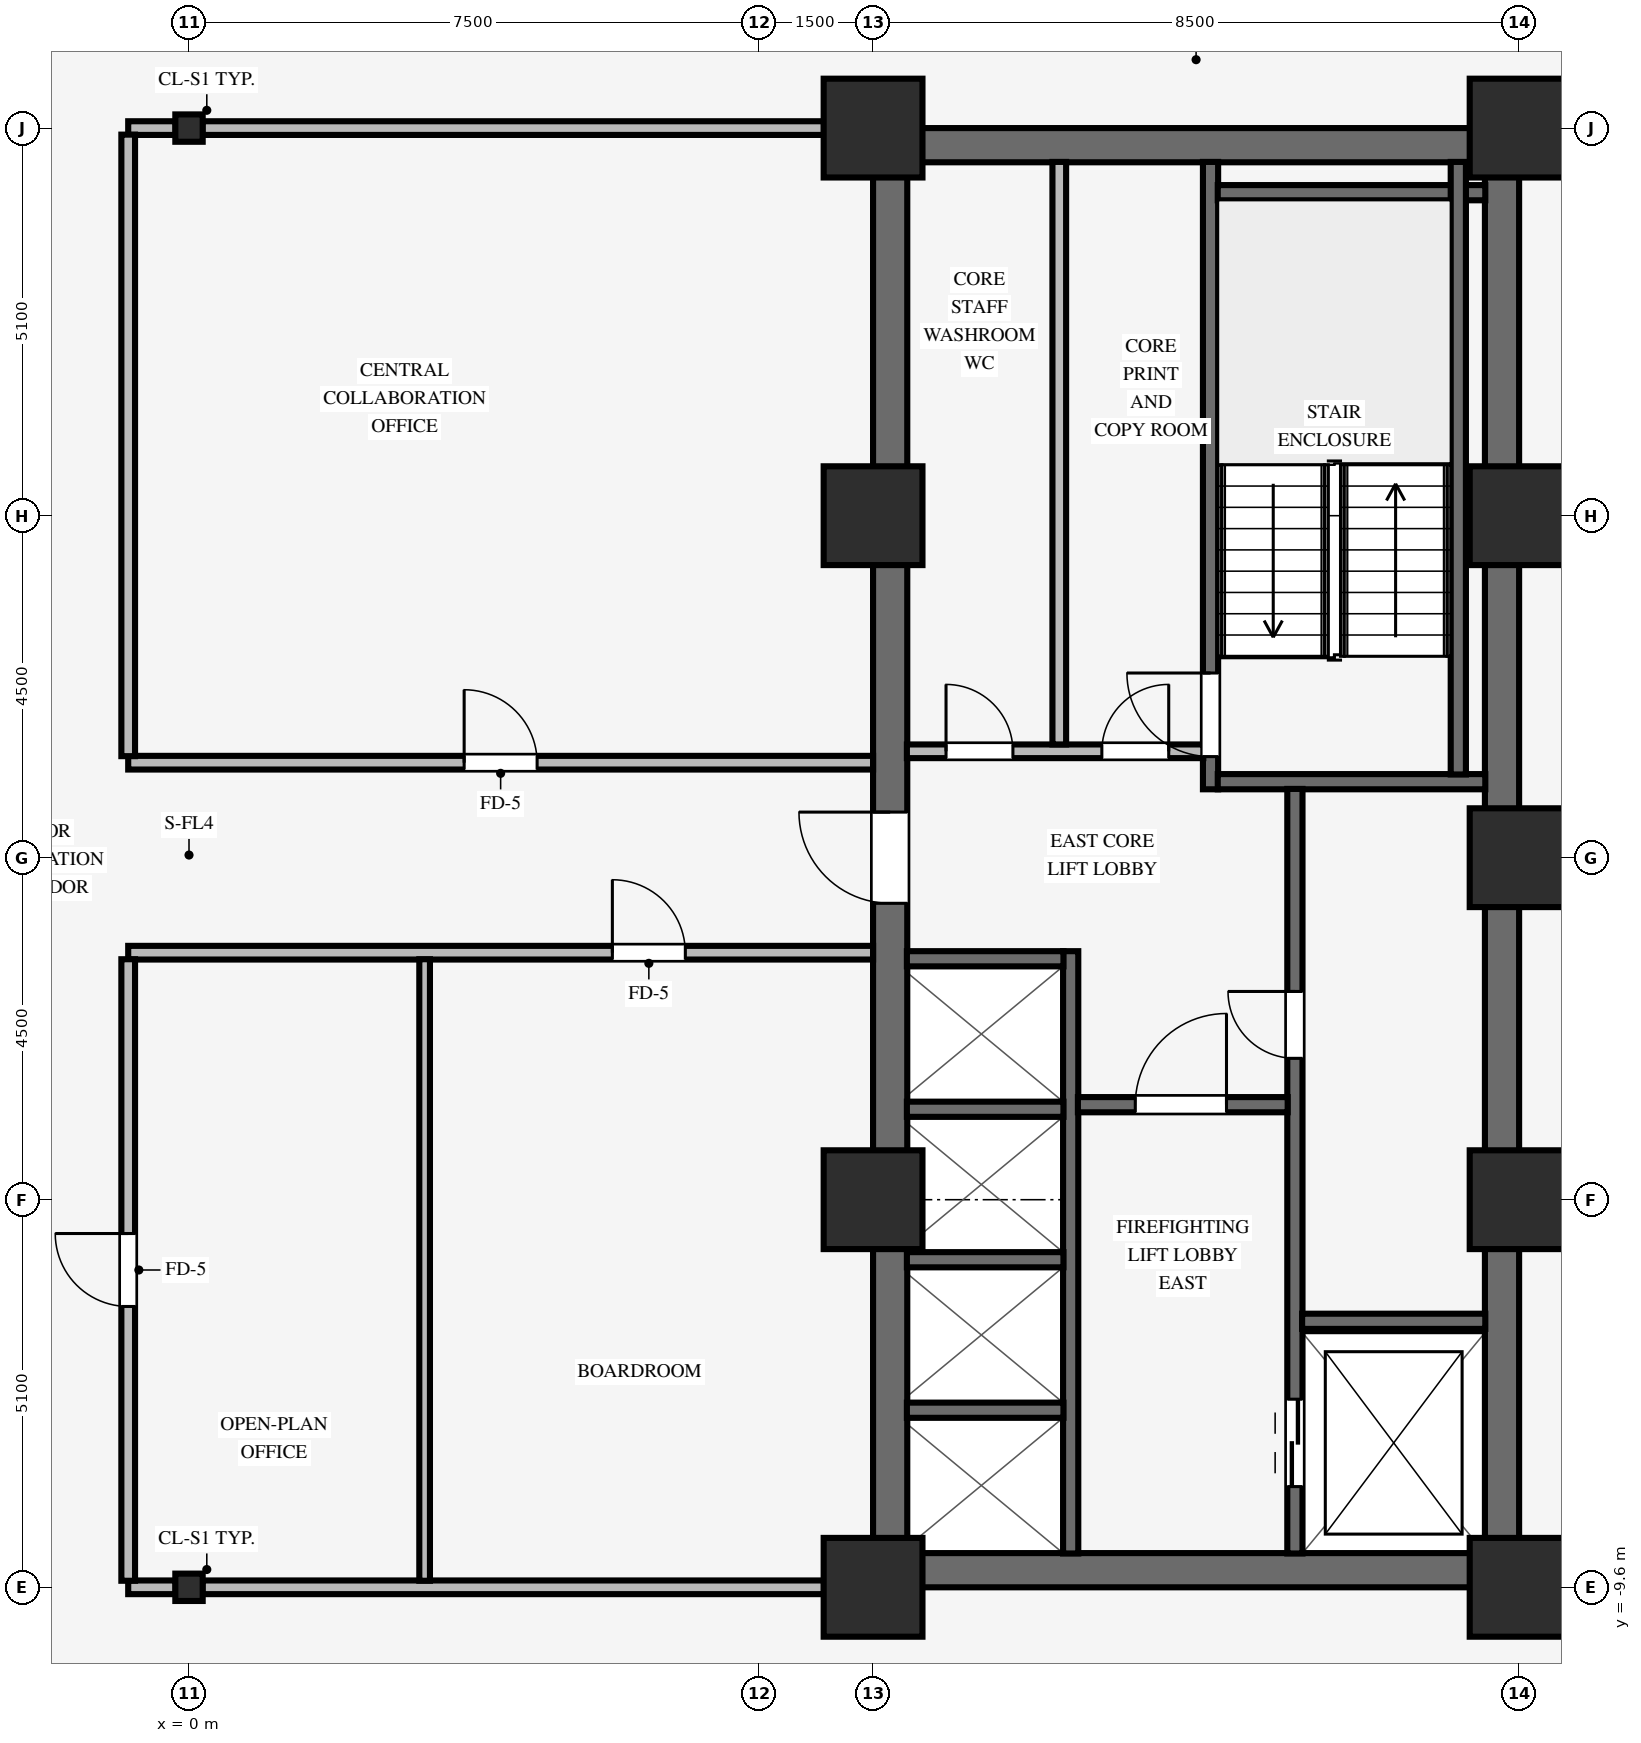
"""IFC4 building model, lengths in metres.
Left out: names, types, materials, properties, quantities, classifications, styles, units other than length and angle.
Written with IfcOpenShell. Run it as: python <this file> out.ifc"""

import sys

from ifc_helpers import new_model, si_unit, direction, frame, frame_2d, origin, origin_2d, place, context, subcontext, project, spatial, rectangle, i_section, extrude, source, transform, mapped, element, fill, save


model = new_model("IFC4")
c1 = context("Model", 3, precision=1e-05, world=origin(), true_north=direction((0.0, 1.0)))
c2 = subcontext(c1, "Body", "Model", "MODEL_VIEW")
j1 = project(units=[si_unit("LENGTHUNIT", "METRE"), si_unit("PLANEANGLEUNIT", "RADIAN")], contexts=[c1])
p1 = place(None, origin())
s1 = spatial("IfcSite", under=j1, at=p1, CompositionType="ELEMENT")
p2 = place(p1, origin())
s2 = spatial("IfcBuilding", under=s1, at=p2, CompositionType="ELEMENT")
p3 = place(p2, frame((0.0, 0.0, 31.25)))
s3 = spatial("IfcBuildingStorey", under=s2, at=p3, CompositionType="ELEMENT", Elevation=31.25)
for number, where, z_axis, x_axis in (
    (1, (9.0, -9.375, 0.0), (0.0, 0.0, 1.0), (1.0, 0.0, 0.0)),
    (2, (9.0, 9.375, 0.0), (0.0, 0.0, 1.0), (1.0, 0.0, 0.0)),
):
    element("IfcWall", number, at=place(p3, frame(where, z_axis=z_axis, x_axis=x_axis)), inside=s3, PredefinedType="SHEAR", context=c2, shape_type="SweptSolid", body=[
        extrude(rectangle(XDim=8.5, YDim=0.45, at=frame_2d((4.25, 0.0))), origin(), (0.0, 0.0, 1.0), 3.37),
    ])
p4 = place(p3, frame((9.225, -9.155, 0.0), z_axis=(0.0, 0.0, 1.0), x_axis=(0.0, 1.0, 0.0)))
e3 = element("IfcWall", 3, at=p4, inside=s3, PredefinedType="SHEAR", context=c2, shape_type="SweptSolid", body=[
    extrude(rectangle(XDim=18.31, YDim=0.45, at=frame_2d((9.155, 0.0))), origin(), (0.0, 0.0, 1.0), 3.37),
])
p5 = place(p4, frame((8.555, 0.0, 0.0)))
e4 = element("IfcOpeningElement", 4, at=p5, cuts=e3, PredefinedType="OPENING", context=c2, shape_type="SweptSolid", body=[
    extrude(rectangle(XDim=1.2, YDim=2.15, at=frame_2d((0.6, 1.075))), frame((0.0, 0.235, 0.0), z_axis=(0.0, -1.0, 0.0), x_axis=(1.0, 0.0, 0.0)), (0.0, 0.0, 1.0), 0.47),
])
p6 = place(p3, frame((17.275, -9.155, 0.0), z_axis=(0.0, 0.0, 1.0), x_axis=(0.0, 1.0, 0.0)))
e5 = element("IfcWall", 5, at=p6, inside=s3, PredefinedType="SHEAR", context=c2, shape_type="SweptSolid", body=[
    extrude(rectangle(XDim=18.31, YDim=0.45, at=frame_2d((9.155, 0.0))), origin(), (0.0, 0.0, 1.0), 3.37),
])
for number, where, z_axis, x_axis in (
    (6, (9.0, -9.6, 0.0), (0.0, 0.0, 1.0), (1.0, 0.0, 0.0)),
    (7, (9.0, -4.5, 0.0), (0.0, 0.0, 1.0), (1.0, 0.0, 0.0)),
    (8, (9.0, 4.5, 0.0), (0.0, 0.0, 1.0), (1.0, 0.0, 0.0)),
    (9, (9.0, 9.6, 0.0), (0.0, 0.0, 1.0), (1.0, 0.0, 0.0)),
    (10, (17.5, -9.6, 0.0), (0.0, 0.0, 1.0), (1.0, 0.0, 0.0)),
    (11, (17.5, -4.5, 0.0), (0.0, 0.0, 1.0), (1.0, 0.0, 0.0)),
    (12, (17.5, 4.5, 0.0), (0.0, 0.0, 1.0), (1.0, 0.0, 0.0)),
    (13, (17.5, 9.6, 0.0), (0.0, 0.0, 1.0), (1.0, 0.0, 0.0)),
    (14, (17.5, 0.0, 0.0), (0.0, 0.0, 1.0), (1.0, 0.0, 0.0)),
):
    element("IfcColumn", number, at=place(p3, frame(where, z_axis=z_axis, x_axis=x_axis)), inside=s3, PredefinedType="COLUMN", context=c2, shape_type="SweptSolid", body=[
        extrude(rectangle(XDim=1.3, YDim=1.3, at=origin_2d()), origin(), (0.0, 0.0, 1.0), 3.37),
    ])
for number, where, z_axis, x_axis in (
    (15, (0.0, -9.6, 0.0), (0.0, 0.0, 1.0), (1.0, 0.0, 0.0)),
    (16, (0.0, 9.6, 0.0), (0.0, 0.0, 1.0), (1.0, 0.0, 0.0)),
):
    element("IfcColumn", number, at=place(p3, frame(where, z_axis=z_axis, x_axis=x_axis)), inside=s3, PredefinedType="COLUMN", context=c2, shape_type="SweptSolid", body=[
        extrude(i_section(OverallWidth=0.36, OverallDepth=0.36, WebThickness=0.021, FlangeThickness=0.021, FilletRadius=0.018, at=origin_2d()), origin(), (0.0, 0.0, 1.0), 3.37),
    ])
p7 = place(p3, frame((13.44, 0.9, 0.0), z_axis=(0.0, 0.0, 1.0), x_axis=(0.0, 1.0, 0.0)))
e17 = element("IfcWall", 17, at=p7, inside=s3, PredefinedType="SHEAR", context=c2, shape_type="SweptSolid", body=[
    extrude(rectangle(XDim=8.255, YDim=0.2, at=frame_2d((4.127, 0.0))), origin(), (0.0, 0.0, 1.0), 3.37),
])
p8 = place(p7, frame((0.43, 0.0, 0.0)))
e18 = element("IfcOpeningElement", 18, at=p8, cuts=e17, PredefinedType="OPENING", context=c2, shape_type="SweptSolid", body=[
    extrude(rectangle(XDim=1.1, YDim=2.15, at=frame_2d((0.55, 1.075))), frame((0.0, 0.11, 0.0), z_axis=(0.0, -1.0, 0.0), x_axis=(1.0, 0.0, 0.0)), (0.0, 0.0, 1.0), 0.22),
])
for number, where, z_axis, x_axis in (
    (19, (13.535, 1.0, 0.0), (0.0, 0.0, 1.0), (1.0, 0.0, 0.0)),
    (20, (13.535, 8.75, 0.0), (0.0, 0.0, 1.0), (1.0, 0.0, 0.0)),
):
    element("IfcWall", number, at=place(p3, frame(where, z_axis=z_axis, x_axis=x_axis)), inside=s3, PredefinedType="SHEAR", context=c2, shape_type="SweptSolid", body=[
        extrude(rectangle(XDim=3.52, YDim=0.2, at=frame_2d((1.76, 0.0))), origin(), (0.0, 0.0, 1.0), 3.37),
    ])
p9 = place(p3, frame((16.7, 1.095, 0.0), z_axis=(0.0, 0.0, 1.0), x_axis=(0.0, 1.0, 0.0)))
e21 = element("IfcWall", 21, at=p9, inside=s3, PredefinedType="SHEAR", context=c2, shape_type="SweptSolid", body=[
    extrude(rectangle(XDim=8.06, YDim=0.2, at=frame_2d((4.03, 0.0))), origin(), (0.0, 0.0, 1.0), 3.37),
])
p10 = place(p3, frame((14.55, -9.155, 0.0), z_axis=(0.0, 0.0, 1.0), x_axis=(0.0, 1.0, 0.0)))
e22 = element("IfcWall", 22, at=p10, inside=s3, PredefinedType="SHEAR", context=c2, shape_type="SweptSolid", body=[
    extrude(rectangle(XDim=10.06, YDim=0.2, at=frame_2d((5.03, 0.0))), origin(), (0.0, 0.0, 1.0), 3.37),
])
p11 = place(p10, frame((6.515, 0.0, 0.0)))
e23 = element("IfcOpeningElement", 23, at=p11, cuts=e22, PredefinedType="OPENING", context=c2, shape_type="SweptSolid", body=[
    extrude(rectangle(XDim=0.88, YDim=2.1, at=frame_2d((0.44, 1.05))), frame((0.0, 0.11, 0.0), z_axis=(0.0, -1.0, 0.0), x_axis=(1.0, 0.0, 0.0)), (0.0, 0.0, 1.0), 0.22),
])
p12 = place(p10, frame((0.88, 0.0, 0.0)))
e24 = element("IfcOpeningElement", 24, at=p12, cuts=e22, PredefinedType="OPENING", context=c2, shape_type="SweptSolid", body=[
    extrude(rectangle(XDim=1.15, YDim=2.15, at=frame_2d((0.575, 1.075))), frame((0.0, 0.11, 0.0), z_axis=(0.0, -1.0, 0.0), x_axis=(1.0, 0.0, 0.0)), (0.0, 0.0, 1.0), 0.22),
])
p13 = place(p3, frame((14.645, -6.1, 0.0), z_axis=(0.0, 0.0, 1.0), x_axis=(1.0, 0.0, 0.0)))
e25 = element("IfcWall", 25, at=p13, inside=s3, PredefinedType="SHEAR", context=c2, shape_type="SweptSolid", body=[
    extrude(rectangle(XDim=2.41, YDim=0.2, at=frame_2d((1.205, 0.0))), origin(), (0.0, 0.0, 1.0), 3.37),
])
p14 = place(p3, frame((11.6, -9.155, 0.0), z_axis=(0.0, 0.0, 1.0), x_axis=(0.0, 1.0, 0.0)))
e26 = element("IfcWall", 26, at=p14, inside=s3, PredefinedType="SHEAR", context=c2, shape_type="SweptSolid", body=[
    extrude(rectangle(XDim=7.925, YDim=0.2, at=frame_2d((3.962, 0.0))), origin(), (0.0, 0.0, 1.0), 3.37),
])
p15 = place(p3, frame((11.695, -3.25, 0.0), z_axis=(0.0, 0.0, 1.0), x_axis=(1.0, 0.0, 0.0)))
e27 = element("IfcWall", 27, at=p15, inside=s3, PredefinedType="SHEAR", context=c2, shape_type="SweptSolid", body=[
    extrude(rectangle(XDim=2.76, YDim=0.2, at=frame_2d((1.38, 0.0))), origin(), (0.0, 0.0, 1.0), 3.37),
])
p16 = place(p15, frame((0.755, 0.0, 0.0)))
e28 = element("IfcOpeningElement", 28, at=p16, cuts=e27, PredefinedType="OPENING", context=c2, shape_type="SweptSolid", body=[
    extrude(rectangle(XDim=1.2, YDim=2.15, at=frame_2d((0.6, 1.075))), frame((0.0, 0.11, 0.0), z_axis=(0.0, -1.0, 0.0), x_axis=(1.0, 0.0, 0.0)), (0.0, 0.0, 1.0), 0.22),
])
for number, where, z_axis, x_axis in (
    (29, (9.445, -7.27, 0.0), (0.0, 0.0, 1.0), (1.0, 0.0, 0.0)),
    (30, (9.445, -5.29, 0.0), (0.0, 0.0, 1.0), (1.0, 0.0, 0.0)),
    (31, (9.445, -3.31, 0.0), (0.0, 0.0, 1.0), (1.0, 0.0, 0.0)),
    (32, (9.445, -1.33, 0.0), (0.0, 0.0, 1.0), (1.0, 0.0, 0.0)),
):
    element("IfcWall", number, at=place(p3, frame(where, z_axis=z_axis, x_axis=x_axis)), inside=s3, PredefinedType="SHEAR", context=c2, shape_type="SweptSolid", body=[
        extrude(rectangle(XDim=2.06, YDim=0.2, at=frame_2d((1.03, 0.0))), origin(), (0.0, 0.0, 1.0), 3.37),
    ])
p17 = place(p3, frame((9.445, 1.4, 0.0), z_axis=(0.0, 0.0, 1.0), x_axis=(1.0, 0.0, 0.0)))
e33 = element("IfcWall", 33, at=p17, inside=s3, PredefinedType="PARTITIONING", context=c2, shape_type="SweptSolid", body=[
    extrude(rectangle(XDim=3.9, YDim=0.18, at=frame_2d((1.95, 0.0))), origin(), (0.0, 0.0, 1.0), 3.36),
])
p18 = place(p17, frame((0.515, 0.0, 0.0)))
e34 = element("IfcOpeningElement", 34, at=p18, cuts=e33, PredefinedType="OPENING", context=c2, shape_type="SweptSolid", body=[
    extrude(rectangle(XDim=0.88, YDim=2.1, at=frame_2d((0.44, 1.05))), frame((0.0, 0.1, 0.0), z_axis=(0.0, -1.0, 0.0), x_axis=(1.0, 0.0, 0.0)), (0.0, 0.0, 1.0), 0.2),
])
p19 = place(p17, frame((2.565, 0.0, 0.0)))
e35 = element("IfcOpeningElement", 35, at=p19, cuts=e33, PredefinedType="OPENING", context=c2, shape_type="SweptSolid", body=[
    extrude(rectangle(XDim=0.88, YDim=2.1, at=frame_2d((0.44, 1.05))), frame((0.0, 0.1, 0.0), z_axis=(0.0, -1.0, 0.0), x_axis=(1.0, 0.0, 0.0)), (0.0, 0.0, 1.0), 0.2),
])
p20 = place(p3, frame((11.45, 1.49, 0.0), z_axis=(0.0, 0.0, 1.0), x_axis=(0.0, 1.0, 0.0)))
e36 = element("IfcWall", 36, at=p20, inside=s3, PredefinedType="PARTITIONING", context=c2, shape_type="SweptSolid", body=[
    extrude(rectangle(XDim=7.665, YDim=0.18, at=frame_2d((3.833, 0.0))), origin(), (0.0, 0.0, 1.0), 3.36),
])
p21 = place(p3, frame((-0.8, -9.6, 0.0), z_axis=(0.0, 0.0, 1.0), x_axis=(1.0, 0.0, 0.0)))
e37 = element("IfcWall", 37, at=p21, inside=s3, PredefinedType="PARTITIONING", context=c2, shape_type="SweptSolid", body=[
    extrude(rectangle(XDim=0.624, YDim=0.18, at=frame_2d((0.312, 0.0))), origin(), (0.0, 0.0, 1.0), 2.405),
])
p22 = place(p3, frame((0.176, -9.6, 0.0), z_axis=(0.0, 0.0, 1.0), x_axis=(1.0, 0.0, 0.0)))
e38 = element("IfcWall", 38, at=p22, inside=s3, PredefinedType="PARTITIONING", context=c2, shape_type="SweptSolid", body=[
    extrude(rectangle(XDim=8.178, YDim=0.18, at=frame_2d((4.089, 0.0))), origin(), (0.0, 0.0, 1.0), 2.405),
])
p23 = place(p3, frame((-0.8, -1.25, 0.0), z_axis=(0.0, 0.0, 1.0), x_axis=(1.0, 0.0, 0.0)))
e39 = element("IfcWall", 39, at=p23, inside=s3, PredefinedType="PARTITIONING", context=c2, shape_type="SweptSolid", body=[
    extrude(rectangle(XDim=9.8, YDim=0.18, at=frame_2d((4.9, 0.0))), origin(), (0.0, 0.0, 1.0), 3.36),
])
p24 = place(p23, frame((6.37, 0.0, 0.0)))
e40 = element("IfcOpeningElement", 40, at=p24, cuts=e39, PredefinedType="OPENING", context=c2, shape_type="SweptSolid", body=[
    extrude(rectangle(XDim=0.96, YDim=2.1, at=frame_2d((0.48, 1.05))), frame((0.0, 0.1, 0.0), z_axis=(0.0, -1.0, 0.0), x_axis=(1.0, 0.0, 0.0)), (0.0, 0.0, 1.0), 0.2),
])
p25 = place(p3, frame((-0.8, 1.25, 0.0), z_axis=(0.0, 0.0, 1.0), x_axis=(1.0, 0.0, 0.0)))
e41 = element("IfcWall", 41, at=p25, inside=s3, PredefinedType="PARTITIONING", context=c2, shape_type="SweptSolid", body=[
    extrude(rectangle(XDim=9.8, YDim=0.18, at=frame_2d((4.9, 0.0))), origin(), (0.0, 0.0, 1.0), 3.36),
])
p26 = place(p25, frame((4.42, 0.0, 0.0)))
e42 = element("IfcOpeningElement", 42, at=p26, cuts=e41, PredefinedType="OPENING", context=c2, shape_type="SweptSolid", body=[
    extrude(rectangle(XDim=0.96, YDim=2.1, at=frame_2d((0.48, 1.05))), frame((0.0, 0.1, 0.0), z_axis=(0.0, -1.0, 0.0), x_axis=(1.0, 0.0, 0.0)), (0.0, 0.0, 1.0), 0.2),
])
p27 = place(p3, frame((-0.8, 9.6, 0.0), z_axis=(0.0, 0.0, 1.0), x_axis=(1.0, 0.0, 0.0)))
e43 = element("IfcWall", 43, at=p27, inside=s3, PredefinedType="PARTITIONING", context=c2, shape_type="SweptSolid", body=[
    extrude(rectangle(XDim=0.624, YDim=0.18, at=frame_2d((0.312, 0.0))), origin(), (0.0, 0.0, 1.0), 2.405),
])
p28 = place(p3, frame((0.176, 9.6, 0.0), z_axis=(0.0, 0.0, 1.0), x_axis=(1.0, 0.0, 0.0)))
e44 = element("IfcWall", 44, at=p28, inside=s3, PredefinedType="PARTITIONING", context=c2, shape_type="SweptSolid", body=[
    extrude(rectangle(XDim=8.178, YDim=0.18, at=frame_2d((4.089, 0.0))), origin(), (0.0, 0.0, 1.0), 2.405),
])
p29 = place(p3, frame((-0.8, -9.514, 0.0), z_axis=(0.0, 0.0, 1.0), x_axis=(0.0, 1.0, 0.0)))
e45 = element("IfcWall", 45, at=p29, inside=s3, PredefinedType="PARTITIONING", context=c2, shape_type="SweptSolid", body=[
    extrude(rectangle(XDim=8.178, YDim=0.18, at=frame_2d((4.089, 0.0))), origin(), (0.0, 0.0, 1.0), 3.36),
])
p30 = place(p29, frame((3.609, 0.0, 0.0)))
e46 = element("IfcOpeningElement", 46, at=p30, cuts=e45, PredefinedType="OPENING", context=c2, shape_type="SweptSolid", body=[
    extrude(rectangle(XDim=0.96, YDim=2.1, at=frame_2d((0.48, 1.05))), frame((0.0, 0.1, 0.0), z_axis=(0.0, -1.0, 0.0), x_axis=(1.0, 0.0, 0.0)), (0.0, 0.0, 1.0), 0.2),
])
p31 = place(p3, frame((-0.8, 1.336, 0.0), z_axis=(0.0, 0.0, 1.0), x_axis=(0.0, 1.0, 0.0)))
e47 = element("IfcWall", 47, at=p31, inside=s3, PredefinedType="PARTITIONING", context=c2, shape_type="SweptSolid", body=[
    extrude(rectangle(XDim=8.178, YDim=0.18, at=frame_2d((4.089, 0.0))), origin(), (0.0, 0.0, 1.0), 3.36),
])
p32 = place(p3, frame((3.1, -9.514, 0.0), z_axis=(0.0, 0.0, 1.0), x_axis=(0.0, 1.0, 0.0)))
e48 = element("IfcWall", 48, at=p32, inside=s3, PredefinedType="PARTITIONING", context=c2, shape_type="SweptSolid", body=[
    extrude(rectangle(XDim=8.178, YDim=0.14, at=frame_2d((4.089, 0.0))), origin(), (0.0, 0.0, 1.0), 3.36),
])
m1 = source(origin(), c2, "Body", "SweptSolid", [
    extrude(rectangle(XDim=1.1, YDim=2.15, at=frame_2d((0.55, 1.075))), frame((0.0, 0.025, 0.0), z_axis=(0.0, -1.0, 0.0), x_axis=(1.0, 0.0, 0.0)), (0.0, 0.0, 1.0), 0.05),
])
p33 = place(p8, origin())
e49 = element("IfcDoor", 49, at=p33, inside=s3, OperationType="SINGLE_SWING_RIGHT", PredefinedType="DOOR", context=c2, shape_type="MappedRepresentation", body=[
    mapped(m1, transform((0.0, 0.0, 0.0), scale=1.0)),
])
fill(e18, e49)
m2 = source(origin(), c2, "Body", "SweptSolid", [
    extrude(rectangle(XDim=0.88, YDim=2.1, at=frame_2d((0.44, 1.05))), frame((0.0, 0.025, 0.0), z_axis=(0.0, -1.0, 0.0), x_axis=(1.0, 0.0, 0.0)), (0.0, 0.0, 1.0), 0.05),
])
p34 = place(p11, origin())
e50 = element("IfcDoor", 50, at=p34, inside=s3, OperationType="SINGLE_SWING_RIGHT", PredefinedType="DOOR", context=c2, shape_type="MappedRepresentation", body=[
    mapped(m2, transform((0.0, 0.0, 0.0), scale=1.0)),
])
fill(e23, e50)
m3 = source(origin(), c2, "Body", "SweptSolid", [
    extrude(rectangle(XDim=1.2, YDim=2.15, at=frame_2d((0.6, 1.075))), frame((0.0, 0.025, 0.0), z_axis=(0.0, -1.0, 0.0), x_axis=(1.0, 0.0, 0.0)), (0.0, 0.0, 1.0), 0.05),
])
p35 = place(p16, origin())
e51 = element("IfcDoor", 51, at=p35, inside=s3, OperationType="SINGLE_SWING_RIGHT", PredefinedType="DOOR", context=c2, shape_type="MappedRepresentation", body=[
    mapped(m3, transform((0.0, 0.0, 0.0), scale=1.0)),
])
fill(e28, e51)
p36 = place(p5, origin())
e52 = element("IfcDoor", 52, at=p36, inside=s3, OperationType="SINGLE_SWING_RIGHT", PredefinedType="DOOR", context=c2, shape_type="MappedRepresentation", body=[
    mapped(m3, transform((0.0, 0.0, 0.0), scale=1.0)),
])
fill(e4, e52)
p37 = place(p18, origin())
e53 = element("IfcDoor", 53, at=p37, inside=s3, OperationType="SINGLE_SWING_LEFT", PredefinedType="DOOR", context=c2, shape_type="MappedRepresentation", body=[
    mapped(m2, transform((0.0, 0.0, 0.0), scale=1.0)),
])
fill(e34, e53)
p38 = place(p19, origin())
e54 = element("IfcDoor", 54, at=p38, inside=s3, OperationType="SINGLE_SWING_RIGHT", PredefinedType="DOOR", context=c2, shape_type="MappedRepresentation", body=[
    mapped(m2, transform((0.0, 0.0, 0.0), scale=1.0)),
])
fill(e35, e54)
m4 = source(origin(), c2, "Body", "SweptSolid", [
    extrude(rectangle(XDim=1.15, YDim=2.15, at=frame_2d((0.575, 1.075))), frame((0.0, 0.025, 0.0), z_axis=(0.0, -1.0, 0.0), x_axis=(1.0, 0.0, 0.0)), (0.0, 0.0, 1.0), 0.05),
])
p39 = place(p12, origin())
e55 = element("IfcDoor", 55, at=p39, inside=s3, OperationType="DOUBLE_DOOR_SLIDING", PredefinedType="DOOR", context=c2, shape_type="MappedRepresentation", body=[
    mapped(m4, transform((0.0, 0.0, 0.0), scale=1.0)),
])
fill(e24, e55)
m5 = source(origin(), c2, "Body", "SweptSolid", [
    extrude(rectangle(XDim=0.96, YDim=2.1, at=frame_2d((0.48, 1.05))), frame((0.0, 0.025, 0.0), z_axis=(0.0, -1.0, 0.0), x_axis=(1.0, 0.0, 0.0)), (0.0, 0.0, 1.0), 0.05),
])
p40 = place(p26, origin())
e56 = element("IfcDoor", 56, at=p40, inside=s3, OperationType="SINGLE_SWING_LEFT", PredefinedType="DOOR", context=c2, shape_type="MappedRepresentation", body=[
    mapped(m5, transform((0.0, 0.0, 0.0), scale=1.0)),
])
fill(e42, e56)
p41 = place(p30, origin())
e57 = element("IfcDoor", 57, at=p41, inside=s3, OperationType="SINGLE_SWING_RIGHT", PredefinedType="DOOR", context=c2, shape_type="MappedRepresentation", body=[
    mapped(m5, transform((0.0, 0.0, 0.0), scale=1.0)),
])
fill(e46, e57)
p42 = place(p24, origin())
e58 = element("IfcDoor", 58, at=p42, inside=s3, OperationType="SINGLE_SWING_LEFT", PredefinedType="DOOR", context=c2, shape_type="MappedRepresentation", body=[
    mapped(m5, transform((0.0, 0.0, 0.0), scale=1.0)),
])
fill(e40, e58)
save(model, sys.argv[1])
